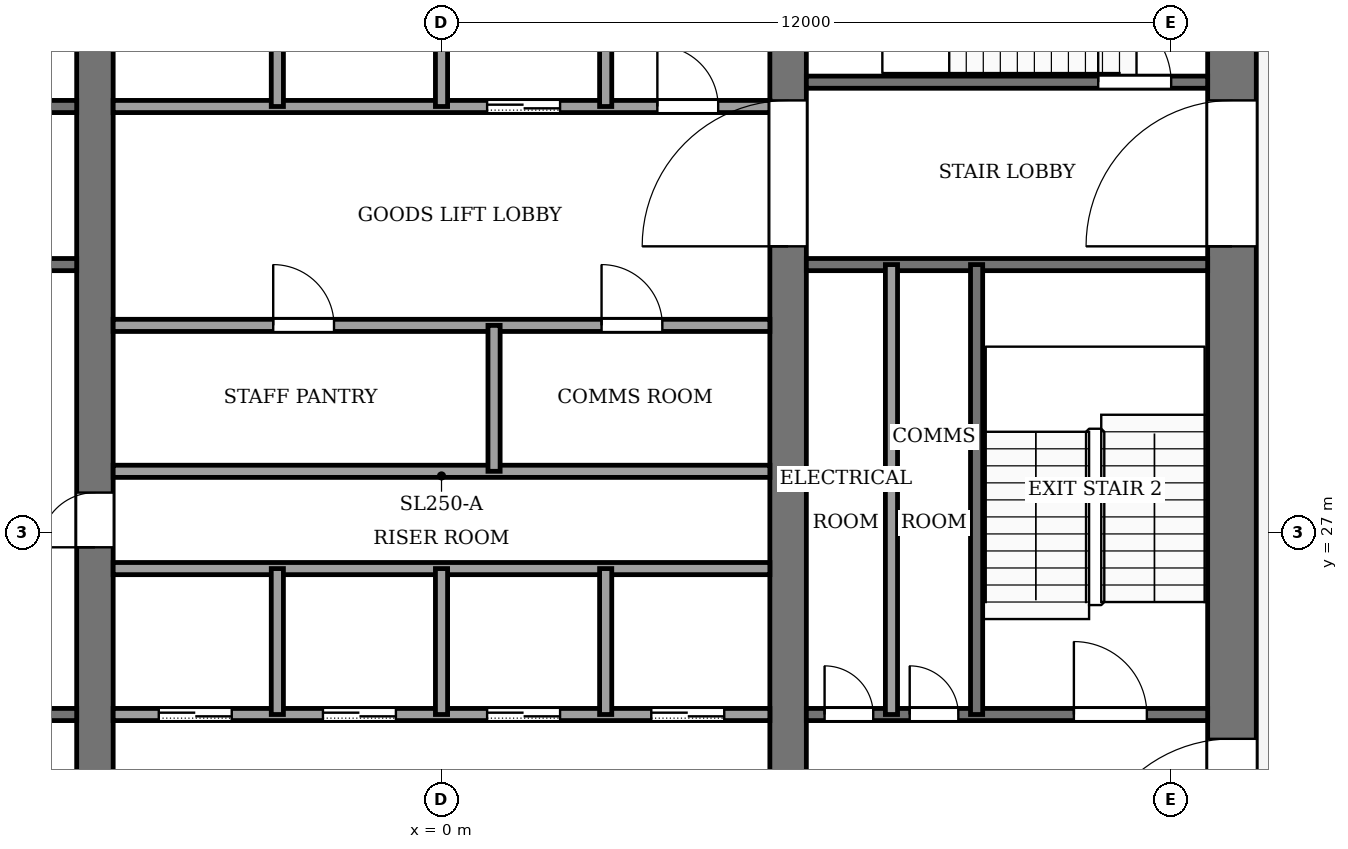
"""IFC4 building model, lengths in metres.
Left out: names, types, materials, properties, quantities, classifications, styles, units other than length and angle.
Written with IfcOpenShell. Run it as: python <this file> out.ifc"""

import sys

from ifc_helpers import new_model, si_unit, direction, frame, frame_2d, origin, place, context, subcontext, project, spatial, rectangle, extrude, element, fill, save


model = new_model("IFC4")
c1 = context("Model", 3, precision=1e-05, world=origin(), true_north=direction((0.0, 1.0)))
c2 = subcontext(c1, "Body", "Model", "MODEL_VIEW")
j1 = project(units=[si_unit("LENGTHUNIT", "METRE"), si_unit("PLANEANGLEUNIT", "RADIAN")], contexts=[c1])
p1 = place(None, origin())
s1 = spatial("IfcSite", under=j1, at=p1, CompositionType="ELEMENT")
p2 = place(p1, origin())
s2 = spatial("IfcBuilding", under=s1, at=p2, CompositionType="ELEMENT")
p3 = place(p2, frame((0.0, 0.0, 270.0)))
s3 = spatial("IfcBuildingStorey", under=s2, at=p3, CompositionType="ELEMENT", Elevation=270.0)
p4 = place(p3, frame((13.0, 18.4, -0.13), z_axis=(0.0, 0.0, 1.0), x_axis=(0.0, 1.0, 0.0)))
e1 = element("IfcWall", 1, at=p4, inside=s3, PredefinedType="SHEAR", context=c2, shape_type="SweptSolid", body=[
    extrude(rectangle(XDim=19.2, YDim=0.8, at=frame_2d((9.6, 0.0))), origin(), (0.0, 0.0, 1.0), 4.0),
])
p5 = place(p4, frame((2.8, 0.0, 0.13)))
e2 = element("IfcOpeningElement", 2, at=p5, cuts=e1, PredefinedType="OPENING", context=c2, shape_type="SweptSolid", body=[
    extrude(rectangle(XDim=2.4, YDim=2.4, at=frame_2d((1.2, 1.2))), frame((0.0, 0.41, 0.0), z_axis=(0.0, -1.0, 0.0), x_axis=(1.0, 0.0, 0.0)), (0.0, 0.0, 1.0), 0.82),
])
p6 = place(p4, frame((13.3, 0.0, 0.13)))
e3 = element("IfcOpeningElement", 3, at=p6, cuts=e1, PredefinedType="OPENING", context=c2, shape_type="SweptSolid", body=[
    extrude(rectangle(XDim=2.4, YDim=2.4, at=frame_2d((1.2, 1.2))), frame((0.0, 0.41, 0.0), z_axis=(0.0, -1.0, 0.0), x_axis=(1.0, 0.0, 0.0)), (0.0, 0.0, 1.0), 0.82),
])
p7 = place(p3, frame((-5.7, 18.4, -0.13), z_axis=(0.0, 0.0, 1.0), x_axis=(0.0, 1.0, 0.0)))
e4 = element("IfcWall", 4, at=p7, inside=s3, PredefinedType="SHEAR", context=c2, shape_type="SweptSolid", body=[
    extrude(rectangle(XDim=19.2, YDim=0.6, at=frame_2d((9.6, 0.0))), origin(), (0.0, 0.0, 1.0), 4.0),
])
p8 = place(p7, frame((8.35, 0.0, 0.13)))
e5 = element("IfcOpeningElement", 5, at=p8, cuts=e4, PredefinedType="OPENING", context=c2, shape_type="SweptSolid", body=[
    extrude(rectangle(XDim=0.9, YDim=2.1, at=frame_2d((0.45, 1.05))), frame((0.0, 0.31, 0.0), z_axis=(0.0, -1.0, 0.0), x_axis=(1.0, 0.0, 0.0)), (0.0, 0.0, 1.0), 0.62),
])
p9 = place(p3, frame((5.7, 18.4, -0.13), z_axis=(0.0, 0.0, 1.0), x_axis=(0.0, 1.0, 0.0)))
e6 = element("IfcWall", 6, at=p9, inside=s3, PredefinedType="SHEAR", context=c2, shape_type="SweptSolid", body=[
    extrude(rectangle(XDim=19.2, YDim=0.6, at=frame_2d((9.6, 0.0))), origin(), (0.0, 0.0, 1.0), 4.0),
])
p10 = place(p9, frame((13.3, 0.0, 0.13)))
e7 = element("IfcOpeningElement", 7, at=p10, cuts=e6, PredefinedType="OPENING", context=c2, shape_type="SweptSolid", body=[
    extrude(rectangle(XDim=2.4, YDim=2.4, at=frame_2d((1.2, 1.2))), frame((0.0, 0.31, 0.0), z_axis=(0.0, -1.0, 0.0), x_axis=(1.0, 0.0, 0.0)), (0.0, 0.0, 1.0), 0.62),
])
p11 = place(p3, frame((-12.6, 24.0, 0.0), z_axis=(0.0, 0.0, 1.0), x_axis=(1.0, 0.0, 0.0)))
e8 = element("IfcWall", 8, at=p11, inside=s3, PredefinedType="PARTITIONING", context=c2, shape_type="SweptSolid", body=[
    extrude(rectangle(XDim=6.6, YDim=0.2, at=frame_2d((3.3, 0.0))), origin(), (0.0, 0.0, 1.0), 3.87),
])
p12 = place(p11, frame((4.7, 0.0, 0.0)))
e9 = element("IfcOpeningElement", 9, at=p12, cuts=e8, PredefinedType="OPENING", context=c2, shape_type="SweptSolid", body=[
    extrude(rectangle(XDim=1.0, YDim=2.1, at=frame_2d((0.5, 1.05))), frame((0.0, 0.11, 0.0), z_axis=(0.0, -1.0, 0.0), x_axis=(1.0, 0.0, 0.0)), (0.0, 0.0, 1.0), 0.22),
])
p13 = place(p3, frame((-5.4, 24.0, 0.0), z_axis=(0.0, 0.0, 1.0), x_axis=(1.0, 0.0, 0.0)))
e10 = element("IfcWall", 10, at=p13, inside=s3, PredefinedType="PARTITIONING", context=c2, shape_type="SweptSolid", body=[
    extrude(rectangle(XDim=10.8, YDim=0.2, at=frame_2d((5.4, 0.0))), origin(), (0.0, 0.0, 1.0), 3.87),
])
p14 = place(p13, frame((0.75, 0.0, 0.0)))
e11 = element("IfcOpeningElement", 11, at=p14, cuts=e10, PredefinedType="OPENING", context=c2, shape_type="SweptSolid", body=[
    extrude(rectangle(XDim=1.2, YDim=2.2, at=frame_2d((0.6, 1.1))), frame((0.0, 0.11, 0.0), z_axis=(0.0, -1.0, 0.0), x_axis=(1.0, 0.0, 0.0)), (0.0, 0.0, 1.0), 0.22),
])
p15 = place(p13, frame((3.45, 0.0, 0.0)))
e12 = element("IfcOpeningElement", 12, at=p15, cuts=e10, PredefinedType="OPENING", context=c2, shape_type="SweptSolid", body=[
    extrude(rectangle(XDim=1.2, YDim=2.2, at=frame_2d((0.6, 1.1))), frame((0.0, 0.11, 0.0), z_axis=(0.0, -1.0, 0.0), x_axis=(1.0, 0.0, 0.0)), (0.0, 0.0, 1.0), 0.22),
])
p16 = place(p13, frame((6.15, 0.0, 0.0)))
e13 = element("IfcOpeningElement", 13, at=p16, cuts=e10, PredefinedType="OPENING", context=c2, shape_type="SweptSolid", body=[
    extrude(rectangle(XDim=1.2, YDim=2.2, at=frame_2d((0.6, 1.1))), frame((0.0, 0.11, 0.0), z_axis=(0.0, -1.0, 0.0), x_axis=(1.0, 0.0, 0.0)), (0.0, 0.0, 1.0), 0.22),
])
p17 = place(p13, frame((8.85, 0.0, 0.0)))
e14 = element("IfcOpeningElement", 14, at=p17, cuts=e10, PredefinedType="OPENING", context=c2, shape_type="SweptSolid", body=[
    extrude(rectangle(XDim=1.2, YDim=2.2, at=frame_2d((0.6, 1.1))), frame((0.0, 0.11, 0.0), z_axis=(0.0, -1.0, 0.0), x_axis=(1.0, 0.0, 0.0)), (0.0, 0.0, 1.0), 0.22),
])
p18 = place(p3, frame((6.0, 24.0, 0.0), z_axis=(0.0, 0.0, 1.0), x_axis=(1.0, 0.0, 0.0)))
e15 = element("IfcWall", 15, at=p18, inside=s3, PredefinedType="PARTITIONING", context=c2, shape_type="SweptSolid", body=[
    extrude(rectangle(XDim=6.6, YDim=0.2, at=frame_2d((3.3, 0.0))), origin(), (0.0, 0.0, 1.0), 3.87),
])
p19 = place(p18, frame((0.3, 0.0, 0.0)))
e16 = element("IfcOpeningElement", 16, at=p19, cuts=e15, PredefinedType="OPENING", context=c2, shape_type="SweptSolid", body=[
    extrude(rectangle(XDim=0.8, YDim=2.1, at=frame_2d((0.4, 1.05))), frame((0.0, 0.11, 0.0), z_axis=(0.0, -1.0, 0.0), x_axis=(1.0, 0.0, 0.0)), (0.0, 0.0, 1.0), 0.22),
])
p20 = place(p18, frame((1.7, 0.0, 0.0)))
e17 = element("IfcOpeningElement", 17, at=p20, cuts=e15, PredefinedType="OPENING", context=c2, shape_type="SweptSolid", body=[
    extrude(rectangle(XDim=0.8, YDim=2.1, at=frame_2d((0.4, 1.05))), frame((0.0, 0.11, 0.0), z_axis=(0.0, -1.0, 0.0), x_axis=(1.0, 0.0, 0.0)), (0.0, 0.0, 1.0), 0.22),
])
p21 = place(p18, frame((4.4, 0.0, 0.0)))
e18 = element("IfcOpeningElement", 18, at=p21, cuts=e15, PredefinedType="OPENING", context=c2, shape_type="SweptSolid", body=[
    extrude(rectangle(XDim=1.2, YDim=2.2, at=frame_2d((0.6, 1.1))), frame((0.0, 0.11, 0.0), z_axis=(0.0, -1.0, 0.0), x_axis=(1.0, 0.0, 0.0)), (0.0, 0.0, 1.0), 0.22),
])
for number, where, z_axis, x_axis in (
    (19, (-5.4, 26.4, 0.0), (0.0, 0.0, 1.0), (1.0, 0.0, 0.0)),
    (20, (-5.4, 28.0, 0.0), (0.0, 0.0, 1.0), (1.0, 0.0, 0.0)),
):
    element("IfcWall", number, at=place(p3, frame(where, z_axis=z_axis, x_axis=x_axis)), inside=s3, PredefinedType="PARTITIONING", context=c2, shape_type="SweptSolid", body=[
        extrude(rectangle(XDim=10.8, YDim=0.2, at=frame_2d((5.4, 0.0))), origin(), (0.0, 0.0, 1.0), 3.87),
    ])
p22 = place(p3, frame((-5.4, 30.4, 0.0), z_axis=(0.0, 0.0, 1.0), x_axis=(1.0, 0.0, 0.0)))
e21 = element("IfcWall", 21, at=p22, inside=s3, PredefinedType="PARTITIONING", context=c2, shape_type="SweptSolid", body=[
    extrude(rectangle(XDim=10.8, YDim=0.2, at=frame_2d((5.4, 0.0))), origin(), (0.0, 0.0, 1.0), 3.87),
])
p23 = place(p22, frame((2.632, 0.0, 0.0)))
e22 = element("IfcOpeningElement", 22, at=p23, cuts=e21, PredefinedType="OPENING", context=c2, shape_type="SweptSolid", body=[
    extrude(rectangle(XDim=1.0, YDim=2.1, at=frame_2d((0.5, 1.05))), frame((0.0, 0.11, 0.0), z_axis=(0.0, -1.0, 0.0), x_axis=(1.0, 0.0, 0.0)), (0.0, 0.0, 1.0), 0.22),
])
p24 = place(p22, frame((8.032, 0.0, 0.0)))
e23 = element("IfcOpeningElement", 23, at=p24, cuts=e21, PredefinedType="OPENING", context=c2, shape_type="SweptSolid", body=[
    extrude(rectangle(XDim=1.0, YDim=2.1, at=frame_2d((0.5, 1.05))), frame((0.0, 0.11, 0.0), z_axis=(0.0, -1.0, 0.0), x_axis=(1.0, 0.0, 0.0)), (0.0, 0.0, 1.0), 0.22),
])
p25 = place(p3, frame((-12.6, 31.4, 0.0), z_axis=(0.0, 0.0, 1.0), x_axis=(1.0, 0.0, 0.0)))
e24 = element("IfcWall", 24, at=p25, inside=s3, PredefinedType="PARTITIONING", context=c2, shape_type="SweptSolid", body=[
    extrude(rectangle(XDim=6.6, YDim=0.2, at=frame_2d((3.3, 0.0))), origin(), (0.0, 0.0, 1.0), 3.87),
])
p26 = place(p25, frame((1.0, 0.0, 0.0)))
e25 = element("IfcOpeningElement", 25, at=p26, cuts=e24, PredefinedType="OPENING", context=c2, shape_type="SweptSolid", body=[
    extrude(rectangle(XDim=1.2, YDim=2.2, at=frame_2d((0.6, 1.1))), frame((0.0, 0.11, 0.0), z_axis=(0.0, -1.0, 0.0), x_axis=(1.0, 0.0, 0.0)), (0.0, 0.0, 1.0), 0.22),
])
p27 = place(p3, frame((6.0, 31.4, 0.0), z_axis=(0.0, 0.0, 1.0), x_axis=(1.0, 0.0, 0.0)))
e26 = element("IfcWall", 26, at=p27, inside=s3, PredefinedType="PARTITIONING", context=c2, shape_type="SweptSolid", body=[
    extrude(rectangle(XDim=6.6, YDim=0.2, at=frame_2d((3.3, 0.0))), origin(), (0.0, 0.0, 1.0), 3.87),
])
p28 = place(p3, frame((-12.6, 34.0, 0.0), z_axis=(0.0, 0.0, 1.0), x_axis=(1.0, 0.0, 0.0)))
e27 = element("IfcWall", 27, at=p28, inside=s3, PredefinedType="PARTITIONING", context=c2, shape_type="SweptSolid", body=[
    extrude(rectangle(XDim=6.6, YDim=0.2, at=frame_2d((3.3, 0.0))), origin(), (0.0, 0.0, 1.0), 3.87),
])
p29 = place(p28, frame((4.7, 0.0, 0.0)))
e28 = element("IfcOpeningElement", 28, at=p29, cuts=e27, PredefinedType="OPENING", context=c2, shape_type="SweptSolid", body=[
    extrude(rectangle(XDim=1.4, YDim=2.2, at=frame_2d((0.7, 1.1))), frame((0.0, 0.11, 0.0), z_axis=(0.0, -1.0, 0.0), x_axis=(1.0, 0.0, 0.0)), (0.0, 0.0, 1.0), 0.22),
])
p30 = place(p28, frame((2.3, 0.0, 0.0)))
e29 = element("IfcOpeningElement", 29, at=p30, cuts=e27, PredefinedType="OPENING", context=c2, shape_type="SweptSolid", body=[
    extrude(rectangle(XDim=1.4, YDim=2.2, at=frame_2d((0.7, 1.1))), frame((0.0, 0.11, 0.0), z_axis=(0.0, -1.0, 0.0), x_axis=(1.0, 0.0, 0.0)), (0.0, 0.0, 1.0), 0.22),
])
p31 = place(p28, frame((0.45, 0.0, 0.0)))
e30 = element("IfcOpeningElement", 30, at=p31, cuts=e27, PredefinedType="OPENING", context=c2, shape_type="SweptSolid", body=[
    extrude(rectangle(XDim=0.9, YDim=2.1, at=frame_2d((0.45, 1.05))), frame((0.0, 0.11, 0.0), z_axis=(0.0, -1.0, 0.0), x_axis=(1.0, 0.0, 0.0)), (0.0, 0.0, 1.0), 0.22),
])
p32 = place(p3, frame((-5.4, 34.0, 0.0), z_axis=(0.0, 0.0, 1.0), x_axis=(1.0, 0.0, 0.0)))
e31 = element("IfcWall", 31, at=p32, inside=s3, PredefinedType="PARTITIONING", context=c2, shape_type="SweptSolid", body=[
    extrude(rectangle(XDim=10.8, YDim=0.2, at=frame_2d((5.4, 0.0))), origin(), (0.0, 0.0, 1.0), 3.87),
])
p33 = place(p32, frame((6.15, 0.0, 0.0)))
e32 = element("IfcOpeningElement", 32, at=p33, cuts=e31, PredefinedType="OPENING", context=c2, shape_type="SweptSolid", body=[
    extrude(rectangle(XDim=1.2, YDim=2.2, at=frame_2d((0.6, 1.1))), frame((0.0, 0.11, 0.0), z_axis=(0.0, -1.0, 0.0), x_axis=(1.0, 0.0, 0.0)), (0.0, 0.0, 1.0), 0.22),
])
p34 = place(p32, frame((8.95, 0.0, 0.0)))
e33 = element("IfcOpeningElement", 33, at=p34, cuts=e31, PredefinedType="OPENING", context=c2, shape_type="SweptSolid", body=[
    extrude(rectangle(XDim=1.0, YDim=2.1, at=frame_2d((0.5, 1.05))), frame((0.0, 0.11, 0.0), z_axis=(0.0, -1.0, 0.0), x_axis=(1.0, 0.0, 0.0)), (0.0, 0.0, 1.0), 0.22),
])
p35 = place(p3, frame((6.0, 34.4, 0.0), z_axis=(0.0, 0.0, 1.0), x_axis=(1.0, 0.0, 0.0)))
e34 = element("IfcWall", 34, at=p35, inside=s3, PredefinedType="PARTITIONING", context=c2, shape_type="SweptSolid", body=[
    extrude(rectangle(XDim=6.6, YDim=0.2, at=frame_2d((3.3, 0.0))), origin(), (0.0, 0.0, 1.0), 3.87),
])
p36 = place(p35, frame((4.8, 0.0, 0.0)))
e35 = element("IfcOpeningElement", 35, at=p36, cuts=e34, PredefinedType="OPENING", context=c2, shape_type="SweptSolid", body=[
    extrude(rectangle(XDim=1.2, YDim=2.2, at=frame_2d((0.6, 1.1))), frame((0.0, 0.11, 0.0), z_axis=(0.0, -1.0, 0.0), x_axis=(1.0, 0.0, 0.0)), (0.0, 0.0, 1.0), 0.22),
])
p37 = place(p3, frame((-2.7, 24.0, 0.0), z_axis=(0.0, 0.0, 1.0), x_axis=(0.0, 1.0, 0.0)))
e36 = element("IfcWall", 36, at=p37, inside=s3, PredefinedType="PARTITIONING", context=c2, shape_type="SweptSolid", body=[
    extrude(rectangle(XDim=2.4, YDim=0.2, at=frame_2d((1.2, 0.0))), origin(), (0.0, 0.0, 1.0), 3.87),
])
p38 = place(p3, frame((-2.7, 34.0, 0.0), z_axis=(0.0, 0.0, 1.0), x_axis=(0.0, 1.0, 0.0)))
e37 = element("IfcWall", 37, at=p38, inside=s3, PredefinedType="PARTITIONING", context=c2, shape_type="SweptSolid", body=[
    extrude(rectangle(XDim=3.6, YDim=0.2, at=frame_2d((1.8, 0.0))), origin(), (0.0, 0.0, 1.0), 3.87),
])
p39 = place(p3, frame((0.0, 24.0, 0.0), z_axis=(0.0, 0.0, 1.0), x_axis=(0.0, 1.0, 0.0)))
e38 = element("IfcWall", 38, at=p39, inside=s3, PredefinedType="PARTITIONING", context=c2, shape_type="SweptSolid", body=[
    extrude(rectangle(XDim=2.4, YDim=0.2, at=frame_2d((1.2, 0.0))), origin(), (0.0, 0.0, 1.0), 3.87),
])
p40 = place(p3, frame((0.0, 34.0, 0.0), z_axis=(0.0, 0.0, 1.0), x_axis=(0.0, 1.0, 0.0)))
e39 = element("IfcWall", 39, at=p40, inside=s3, PredefinedType="PARTITIONING", context=c2, shape_type="SweptSolid", body=[
    extrude(rectangle(XDim=3.6, YDim=0.2, at=frame_2d((1.8, 0.0))), origin(), (0.0, 0.0, 1.0), 3.87),
])
for number, where, z_axis, x_axis in (
    (40, (0.864, 28.0, 0.0), (0.0, 0.0, 1.0), (0.0, 1.0, 0.0)),
    (41, (2.7, 24.0, 0.0), (0.0, 0.0, 1.0), (0.0, 1.0, 0.0)),
):
    element("IfcWall", number, at=place(p3, frame(where, z_axis=z_axis, x_axis=x_axis)), inside=s3, PredefinedType="PARTITIONING", context=c2, shape_type="SweptSolid", body=[
        extrude(rectangle(XDim=2.4, YDim=0.2, at=frame_2d((1.2, 0.0))), origin(), (0.0, 0.0, 1.0), 3.87),
    ])
p41 = place(p3, frame((2.7, 34.0, 0.0), z_axis=(0.0, 0.0, 1.0), x_axis=(0.0, 1.0, 0.0)))
e42 = element("IfcWall", 42, at=p41, inside=s3, PredefinedType="PARTITIONING", context=c2, shape_type="SweptSolid", body=[
    extrude(rectangle(XDim=3.6, YDim=0.2, at=frame_2d((1.8, 0.0))), origin(), (0.0, 0.0, 1.0), 3.87),
])
for number, where, z_axis, x_axis in (
    (43, (7.4, 24.0, 0.0), (0.0, 0.0, 1.0), (0.0, 1.0, 0.0)),
    (44, (8.8, 24.0, 0.0), (0.0, 0.0, 1.0), (0.0, 1.0, 0.0)),
):
    element("IfcWall", number, at=place(p3, frame(where, z_axis=z_axis, x_axis=x_axis)), inside=s3, PredefinedType="PARTITIONING", context=c2, shape_type="SweptSolid", body=[
        extrude(rectangle(XDim=7.4, YDim=0.2, at=frame_2d((3.7, 0.0))), origin(), (0.0, 0.0, 1.0), 3.87),
    ])
p42 = place(p14, origin())
e45 = element("IfcDoor", 45, at=p42, inside=s3, OperationType="SLIDING_TO_LEFT", PredefinedType="DOOR", context=c2, shape_type="SweptSolid", body=[
    extrude(rectangle(XDim=1.2, YDim=2.2, at=frame_2d((0.6, 1.1))), frame((0.0, 0.025, 0.0), z_axis=(0.0, -1.0, 0.0), x_axis=(1.0, 0.0, 0.0)), (0.0, 0.0, 1.0), 0.05),
])
fill(e11, e45)
p43 = place(p15, origin())
e46 = element("IfcDoor", 46, at=p43, inside=s3, OperationType="SLIDING_TO_LEFT", PredefinedType="DOOR", context=c2, shape_type="SweptSolid", body=[
    extrude(rectangle(XDim=1.2, YDim=2.2, at=frame_2d((0.6, 1.1))), frame((0.0, 0.025, 0.0), z_axis=(0.0, -1.0, 0.0), x_axis=(1.0, 0.0, 0.0)), (0.0, 0.0, 1.0), 0.05),
])
fill(e12, e46)
p44 = place(p16, origin())
e47 = element("IfcDoor", 47, at=p44, inside=s3, OperationType="SLIDING_TO_LEFT", PredefinedType="DOOR", context=c2, shape_type="SweptSolid", body=[
    extrude(rectangle(XDim=1.2, YDim=2.2, at=frame_2d((0.6, 1.1))), frame((0.0, 0.025, 0.0), z_axis=(0.0, -1.0, 0.0), x_axis=(1.0, 0.0, 0.0)), (0.0, 0.0, 1.0), 0.05),
])
fill(e13, e47)
p45 = place(p17, origin())
e48 = element("IfcDoor", 48, at=p45, inside=s3, OperationType="SLIDING_TO_LEFT", PredefinedType="DOOR", context=c2, shape_type="SweptSolid", body=[
    extrude(rectangle(XDim=1.2, YDim=2.2, at=frame_2d((0.6, 1.1))), frame((0.0, 0.025, 0.0), z_axis=(0.0, -1.0, 0.0), x_axis=(1.0, 0.0, 0.0)), (0.0, 0.0, 1.0), 0.05),
])
fill(e14, e48)
p46 = place(p33, origin())
e49 = element("IfcDoor", 49, at=p46, inside=s3, OperationType="SLIDING_TO_LEFT", PredefinedType="DOOR", context=c2, shape_type="SweptSolid", body=[
    extrude(rectangle(XDim=1.2, YDim=2.2, at=frame_2d((0.6, 1.1))), frame((0.0, 0.025, 0.0), z_axis=(0.0, -1.0, 0.0), x_axis=(1.0, 0.0, 0.0)), (0.0, 0.0, 1.0), 0.05),
])
fill(e32, e49)
p47 = place(p23, origin())
e50 = element("IfcDoor", 50, at=p47, inside=s3, OperationType="SINGLE_SWING_LEFT", PredefinedType="DOOR", context=c2, shape_type="SweptSolid", body=[
    extrude(rectangle(XDim=1.0, YDim=2.1, at=frame_2d((0.5, 1.05))), frame((0.0, 0.025, 0.0), z_axis=(0.0, -1.0, 0.0), x_axis=(1.0, 0.0, 0.0)), (0.0, 0.0, 1.0), 0.05),
])
fill(e22, e50)
p48 = place(p24, origin())
e51 = element("IfcDoor", 51, at=p48, inside=s3, OperationType="SINGLE_SWING_RIGHT", PredefinedType="DOOR", context=c2, shape_type="SweptSolid", body=[
    extrude(rectangle(XDim=1.0, YDim=2.1, at=frame_2d((0.5, 1.05))), frame((0.0, 0.025, 0.0), z_axis=(0.0, -1.0, 0.0), x_axis=(1.0, 0.0, 0.0)), (0.0, 0.0, 1.0), 0.05),
])
fill(e23, e51)
p49 = place(p19, origin())
e52 = element("IfcDoor", 52, at=p49, inside=s3, OperationType="SINGLE_SWING_LEFT", PredefinedType="DOOR", context=c2, shape_type="SweptSolid", body=[
    extrude(rectangle(XDim=0.8, YDim=2.1, at=frame_2d((0.4, 1.05))), frame((0.0, 0.025, 0.0), z_axis=(0.0, -1.0, 0.0), x_axis=(1.0, 0.0, 0.0)), (0.0, 0.0, 1.0), 0.05),
])
fill(e16, e52)
p50 = place(p20, origin())
e53 = element("IfcDoor", 53, at=p50, inside=s3, OperationType="SINGLE_SWING_RIGHT", PredefinedType="DOOR", context=c2, shape_type="SweptSolid", body=[
    extrude(rectangle(XDim=0.8, YDim=2.1, at=frame_2d((0.4, 1.05))), frame((0.0, 0.025, 0.0), z_axis=(0.0, -1.0, 0.0), x_axis=(1.0, 0.0, 0.0)), (0.0, 0.0, 1.0), 0.05),
])
fill(e17, e53)
p51 = place(p34, origin())
e54 = element("IfcDoor", 54, at=p51, inside=s3, OperationType="SINGLE_SWING_LEFT", PredefinedType="DOOR", context=c2, shape_type="SweptSolid", body=[
    extrude(rectangle(XDim=1.0, YDim=2.1, at=frame_2d((0.5, 1.05))), frame((0.0, 0.025, 0.0), z_axis=(0.0, -1.0, 0.0), x_axis=(1.0, 0.0, 0.0)), (0.0, 0.0, 1.0), 0.05),
])
fill(e33, e54)
p52 = place(p8, origin())
e55 = element("IfcDoor", 55, at=p52, inside=s3, OperationType="SINGLE_SWING_RIGHT", PredefinedType="DOOR", context=c2, shape_type="SweptSolid", body=[
    extrude(rectangle(XDim=0.9, YDim=2.1, at=frame_2d((0.45, 1.05))), frame((0.0, 0.025, 0.0), z_axis=(0.0, -1.0, 0.0), x_axis=(1.0, 0.0, 0.0)), (0.0, 0.0, 1.0), 0.05),
])
fill(e5, e55)
p53 = place(p21, origin())
e56 = element("IfcDoor", 56, at=p53, inside=s3, OperationType="SINGLE_SWING_LEFT", PredefinedType="DOOR", context=c2, shape_type="SweptSolid", body=[
    extrude(rectangle(XDim=1.2, YDim=2.2, at=frame_2d((0.6, 1.1))), frame((0.0, 0.025, 0.0), z_axis=(0.0, -1.0, 0.0), x_axis=(1.0, 0.0, 0.0)), (0.0, 0.0, 1.0), 0.05),
])
fill(e18, e56)
p54 = place(p36, origin())
e57 = element("IfcDoor", 57, at=p54, inside=s3, OperationType="SINGLE_SWING_RIGHT", PredefinedType="DOOR", context=c2, shape_type="SweptSolid", body=[
    extrude(rectangle(XDim=1.2, YDim=2.2, at=frame_2d((0.6, 1.1))), frame((0.0, 0.025, 0.0), z_axis=(0.0, -1.0, 0.0), x_axis=(1.0, 0.0, 0.0)), (0.0, 0.0, 1.0), 0.05),
])
fill(e35, e57)
p55 = place(p10, origin())
e58 = element("IfcDoor", 58, at=p55, inside=s3, OperationType="DOUBLE_DOOR_SINGLE_SWING", PredefinedType="DOOR", context=c2, shape_type="SweptSolid", body=[
    extrude(rectangle(XDim=2.4, YDim=2.4, at=frame_2d((1.2, 1.2))), frame((0.0, 0.025, 0.0), z_axis=(0.0, -1.0, 0.0), x_axis=(1.0, 0.0, 0.0)), (0.0, 0.0, 1.0), 0.05),
])
fill(e7, e58)
p56 = place(p5, origin())
e59 = element("IfcDoor", 59, at=p56, inside=s3, OperationType="DOUBLE_DOOR_SINGLE_SWING", PredefinedType="DOOR", context=c2, shape_type="SweptSolid", body=[
    extrude(rectangle(XDim=2.4, YDim=2.4, at=frame_2d((1.2, 1.2))), frame((0.0, 0.025, 0.0), z_axis=(0.0, -1.0, 0.0), x_axis=(1.0, 0.0, 0.0)), (0.0, 0.0, 1.0), 0.05),
])
fill(e2, e59)
p57 = place(p6, origin())
e60 = element("IfcDoor", 60, at=p57, inside=s3, OperationType="DOUBLE_DOOR_SINGLE_SWING", PredefinedType="DOOR", context=c2, shape_type="SweptSolid", body=[
    extrude(rectangle(XDim=2.4, YDim=2.4, at=frame_2d((1.2, 1.2))), frame((0.0, 0.025, 0.0), z_axis=(0.0, -1.0, 0.0), x_axis=(1.0, 0.0, 0.0)), (0.0, 0.0, 1.0), 0.05),
])
fill(e3, e60)
save(model, sys.argv[1])
